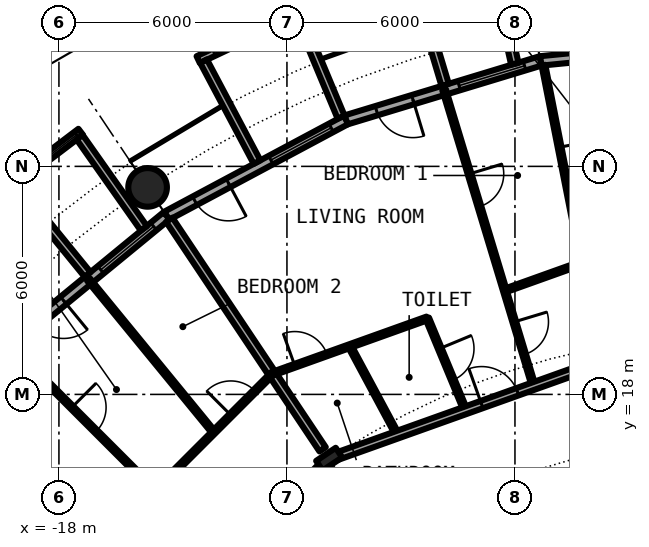
"""IFC4 building model, lengths in metres.
Left out: names, types, materials, properties, quantities, classifications, styles, units other than length and angle.
Written with IfcOpenShell. Run it as: python <this file> out.ifc"""

import sys

from ifc_helpers import new_model, si_unit, direction, frame, frame_2d, origin, origin_2d, place, context, subcontext, project, spatial, rectangle, circle, hollow_circle, i_section, extrude, element, fill, save


model = new_model("IFC4")
c1 = context("Model", 3, precision=1e-05, world=origin(), true_north=direction((0.0, 1.0)))
c2 = subcontext(c1, "Body", "Model", "MODEL_VIEW")
j1 = project(units=[si_unit("LENGTHUNIT", "METRE"), si_unit("PLANEANGLEUNIT", "RADIAN")], contexts=[c1])
p1 = place(None, origin())
s1 = spatial("IfcSite", under=j1, at=p1, CompositionType="ELEMENT")
p2 = place(p1, origin())
s2 = spatial("IfcBuilding", under=s1, at=p2, CompositionType="ELEMENT")
p3 = place(p2, frame((0.0, 0.0, 41.1)))
s3 = spatial("IfcBuildingStorey", under=s2, at=p3, CompositionType="ELEMENT", Elevation=41.1)
p4 = place(p3, frame((-15.667, 23.448, 0.0), z_axis=(0.0, 0.0, 1.0), x_axis=(1.0, 0.0, 0.0)))
e1 = element("IfcColumn", 1, at=p4, inside=s3, PredefinedType="COLUMN", context=c2, shape_type="SweptSolid", body=[
    extrude(hollow_circle(Radius=0.508, WallThickness=0.05, at=origin_2d()), origin(), (0.0, 0.0, 1.0), 3.05),
])
p5 = place(p3, frame((-10.889, 16.297, 0.0), z_axis=(0.0, 0.0, 1.0), x_axis=(-0.55557023302, 0.831469612303, 0.0)))
e2 = element("IfcColumn", 2, at=p5, inside=s3, PredefinedType="COLUMN", context=c2, shape_type="SweptSolid", body=[
    extrude(i_section(OverallWidth=0.305, OverallDepth=0.62, WebThickness=0.021, FlangeThickness=0.04, FilletRadius=0.027, at=origin_2d()), origin(), (0.0, 0.0, 1.0), 3.05),
])
p6 = place(p3, frame((0.0, 27.3, 0.0), z_axis=(0.0, 0.0, 1.0), x_axis=(-0.995173996315, -0.098126026407, 0.0)))
e3 = element("IfcWall", 3, at=p6, inside=s3, PredefinedType="SOLIDWALL", context=c2, shape_type="SweptSolid", body=[
    extrude(rectangle(XDim=5.352, YDim=0.25, at=frame_2d((2.676, 0.0))), origin(), (0.0, 0.0, 1.0), 2.7),
])
p7 = place(p6, frame((0.441, 0.0, 0.3)))
e4 = element("IfcOpeningElement", 4, at=p7, cuts=e3, PredefinedType="OPENING", context=c2, shape_type="SweptSolid", body=[
    extrude(rectangle(XDim=1.8, YDim=2.1, at=frame_2d((0.9, 1.05))), frame((0.0, 0.135, 0.0), z_axis=(0.0, -1.0, 0.0), x_axis=(1.0, 0.0, 0.0)), (0.0, 0.0, 1.0), 0.27),
])
p8 = place(p6, frame((3.51, 0.0, 0.0)))
e5 = element("IfcOpeningElement", 5, at=p8, cuts=e3, PredefinedType="OPENING", context=c2, shape_type="SweptSolid", body=[
    extrude(rectangle(XDim=1.0, YDim=2.2, at=frame_2d((0.5, 1.1))), frame((0.0, 0.135, 0.0), z_axis=(0.0, -1.0, 0.0), x_axis=(1.0, 0.0, 0.0)), (0.0, 0.0, 1.0), 0.27),
])
p9 = place(p3, frame((-5.326, 26.775, 0.0), z_axis=(0.0, 0.0, 1.0), x_axis=(-0.956965678721, -0.290201119486, 0.0)))
e6 = element("IfcWall", 6, at=p9, inside=s3, PredefinedType="SOLIDWALL", context=c2, shape_type="SweptSolid", body=[
    extrude(rectangle(XDim=5.351, YDim=0.25, at=frame_2d((2.676, 0.0))), origin(), (0.0, 0.0, 1.0), 2.7),
])
p10 = place(p9, frame((0.441, 0.0, 0.3)))
e7 = element("IfcOpeningElement", 7, at=p10, cuts=e6, PredefinedType="OPENING", context=c2, shape_type="SweptSolid", body=[
    extrude(rectangle(XDim=1.8, YDim=2.1, at=frame_2d((0.9, 1.05))), frame((0.0, 0.135, 0.0), z_axis=(0.0, -1.0, 0.0), x_axis=(1.0, 0.0, 0.0)), (0.0, 0.0, 1.0), 0.27),
])
p11 = place(p9, frame((3.51, 0.0, 0.0)))
e8 = element("IfcOpeningElement", 8, at=p11, cuts=e6, PredefinedType="OPENING", context=c2, shape_type="SweptSolid", body=[
    extrude(rectangle(XDim=1.0, YDim=2.2, at=frame_2d((0.5, 1.1))), frame((0.0, 0.135, 0.0), z_axis=(0.0, -1.0, 0.0), x_axis=(1.0, 0.0, 0.0)), (0.0, 0.0, 1.0), 0.27),
])
p12 = place(p3, frame((-6.004, 26.7, -0.03), z_axis=(0.0, 0.0, 1.0), x_axis=(-0.219609259383, 0.975587911566, 0.0)))
e9 = element("IfcWall", 9, at=p12, inside=s3, PredefinedType="SOLIDWALL", context=c2, shape_type="SweptSolid", body=[
    extrude(rectangle(XDim=2.933, YDim=0.2, at=frame_2d((1.466, 0.0))), origin(), (0.0, 0.0, 1.0), 2.73),
])
p13 = place(p3, frame((-7.837, 26.144, -0.03), z_axis=(0.0, 0.0, 1.0), x_axis=(-0.287064767992, 0.957911174889, 0.0)))
e10 = element("IfcWall", 10, at=p13, inside=s3, PredefinedType="SOLIDWALL", context=c2, shape_type="SweptSolid", body=[
    extrude(rectangle(XDim=3.006, YDim=0.2, at=frame_2d((1.503, 0.0))), origin(), (0.0, 0.0, 1.0), 2.73),
])
p14 = place(p3, frame((-10.447, 25.222, 0.0), z_axis=(0.0, 0.0, 1.0), x_axis=(-0.881915646801, -0.471407246368, 0.0)))
e11 = element("IfcWall", 11, at=p14, inside=s3, PredefinedType="SOLIDWALL", context=c2, shape_type="SweptSolid", body=[
    extrude(rectangle(XDim=5.352, YDim=0.25, at=frame_2d((2.676, 0.0))), origin(), (0.0, 0.0, 1.0), 2.7),
])
p15 = place(p14, frame((0.441, 0.0, 0.3)))
e12 = element("IfcOpeningElement", 12, at=p15, cuts=e11, PredefinedType="OPENING", context=c2, shape_type="SweptSolid", body=[
    extrude(rectangle(XDim=1.8, YDim=2.1, at=frame_2d((0.9, 1.05))), frame((0.0, 0.135, 0.0), z_axis=(0.0, -1.0, 0.0), x_axis=(1.0, 0.0, 0.0)), (0.0, 0.0, 1.0), 0.27),
])
p16 = place(p14, frame((3.51, 0.0, 0.0)))
e13 = element("IfcOpeningElement", 13, at=p16, cuts=e11, PredefinedType="OPENING", context=c2, shape_type="SweptSolid", body=[
    extrude(rectangle(XDim=1.0, YDim=2.2, at=frame_2d((0.5, 1.1))), frame((0.0, 0.135, 0.0), z_axis=(0.0, -1.0, 0.0), x_axis=(1.0, 0.0, 0.0)), (0.0, 0.0, 1.0), 0.27),
])
p17 = place(p3, frame((-11.629, 28.088, -0.03), z_axis=(0.0, 0.0, 1.0), x_axis=(-0.904000060331, -0.427532327342, 0.0)))
e14 = element("IfcWall", 14, at=p17, inside=s3, PredefinedType="SOLIDWALL", context=c2, shape_type="SweptSolid", body=[
    extrude(rectangle(XDim=2.993, YDim=0.2, at=frame_2d((1.497, 0.0))), origin(), (0.0, 0.0, 1.0), 2.73),
])
p18 = place(p17, frame((0.457, 0.0, 0.33)))
e15 = element("IfcOpeningElement", 15, at=p18, cuts=e14, PredefinedType="OPENING", context=c2, shape_type="SweptSolid", body=[
    extrude(circle(Radius=1.04, at=frame_2d((1.04, 1.04))), frame((0.0, 0.11, 0.0), z_axis=(0.0, -1.0, 0.0), x_axis=(1.0, 0.0, 0.0)), (0.0, 0.0, 1.0), 0.22),
])
p19 = place(p3, frame((-10.575, 25.295, -0.03), z_axis=(0.0, 0.0, 1.0), x_axis=(-0.385697364644, 0.922625353492, 0.0)))
e16 = element("IfcWall", 16, at=p19, inside=s3, PredefinedType="SOLIDWALL", context=c2, shape_type="SweptSolid", body=[
    extrude(rectangle(XDim=2.883, YDim=0.2, at=frame_2d((1.442, 0.0))), origin(), (0.0, 0.0, 1.0), 2.73),
])
p20 = place(p3, frame((-12.787, 24.113, -0.03), z_axis=(0.0, 0.0, 1.0), x_axis=(-0.468365282436, 0.883534924159, 0.0)))
e17 = element("IfcWall", 17, at=p20, inside=s3, PredefinedType="SOLIDWALL", context=c2, shape_type="SweptSolid", body=[
    extrude(rectangle(XDim=3.006, YDim=0.2, at=frame_2d((1.503, 0.0))), origin(), (0.0, 0.0, 1.0), 2.73),
])
p21 = place(p3, frame((-15.167, 22.699, 0.0), z_axis=(0.0, 0.0, 1.0), x_axis=(-0.773019449054, -0.634382322723, 0.0)))
e18 = element("IfcWall", 18, at=p21, inside=s3, PredefinedType="SOLIDWALL", context=c2, shape_type="SweptSolid", body=[
    extrude(rectangle(XDim=5.352, YDim=0.25, at=frame_2d((2.676, 0.0))), origin(), (0.0, 0.0, 1.0), 2.7),
])
p22 = place(p21, frame((0.441, 0.0, 0.3)))
e19 = element("IfcOpeningElement", 19, at=p22, cuts=e18, PredefinedType="OPENING", context=c2, shape_type="SweptSolid", body=[
    extrude(rectangle(XDim=1.8, YDim=2.1, at=frame_2d((0.9, 1.05))), frame((0.0, 0.135, 0.0), z_axis=(0.0, -1.0, 0.0), x_axis=(1.0, 0.0, 0.0)), (0.0, 0.0, 1.0), 0.27),
])
p23 = place(p21, frame((3.51, 0.0, 0.0)))
e20 = element("IfcOpeningElement", 20, at=p23, cuts=e18, PredefinedType="OPENING", context=c2, shape_type="SweptSolid", body=[
    extrude(rectangle(XDim=1.0, YDim=2.2, at=frame_2d((0.5, 1.1))), frame((0.0, 0.135, 0.0), z_axis=(0.0, -1.0, 0.0), x_axis=(1.0, 0.0, 0.0)), (0.0, 0.0, 1.0), 0.27),
])
p24 = place(p3, frame((-17.427, 24.909, -0.03), z_axis=(0.0, 0.0, 1.0), x_axis=(-0.796842165306, -0.60418752353, 0.0)))
e21 = element("IfcWall", 21, at=p24, inside=s3, PredefinedType="SOLIDWALL", context=c2, shape_type="SweptSolid", body=[
    extrude(rectangle(XDim=2.337, YDim=0.2, at=frame_2d((1.168, 0.0))), origin(), (0.0, 0.0, 1.0), 2.73),
])
p25 = place(p24, frame((0.128, 0.0, 0.33)))
e22 = element("IfcOpeningElement", 22, at=p25, cuts=e21, PredefinedType="OPENING", context=c2, shape_type="SweptSolid", body=[
    extrude(circle(Radius=1.04, at=frame_2d((1.04, 1.04))), frame((0.0, 0.11, 0.0), z_axis=(0.0, -1.0, 0.0), x_axis=(1.0, 0.0, 0.0)), (0.0, 0.0, 1.0), 0.22),
])
p26 = place(p3, frame((-15.765, 22.37, -0.03), z_axis=(0.0, 0.0, 1.0), x_axis=(-0.576274612209, 0.817256123454, 0.0)))
e23 = element("IfcWall", 23, at=p26, inside=s3, PredefinedType="SOLIDWALL", context=c2, shape_type="SweptSolid", body=[
    extrude(rectangle(XDim=2.933, YDim=0.2, at=frame_2d((1.466, 0.0))), origin(), (0.0, 0.0, 1.0), 2.73),
])
p27 = place(p3, frame((-17.246, 21.155, -0.03), z_axis=(0.0, 0.0, 1.0), x_axis=(-0.631741648902, 0.775179004516, 0.0)))
e24 = element("IfcWall", 24, at=p27, inside=s3, PredefinedType="SOLIDWALL", context=c2, shape_type="SweptSolid", body=[
    extrude(rectangle(XDim=3.006, YDim=0.2, at=frame_2d((1.503, 0.0))), origin(), (0.0, 0.0, 1.0), 2.73),
])
p28 = place(p3, frame((-19.216, 19.216, 0.0), z_axis=(0.0, 0.0, 1.0), x_axis=(0.707106781187, -0.707106781187, 0.0)))
e25 = element("IfcWall", 25, at=p28, inside=s3, PredefinedType="PARTITIONING", context=c2, shape_type="SweptSolid", body=[
    extrude(rectangle(XDim=5.305, YDim=0.1, at=frame_2d((2.652, 0.0))), origin(), (0.0, 0.0, 1.0), 2.7),
])
p29 = place(p28, frame((2.202, 0.0, 0.0)))
e26 = element("IfcOpeningElement", 26, at=p29, cuts=e25, PredefinedType="OPENING", context=c2, shape_type="SweptSolid", body=[
    extrude(rectangle(XDim=0.9, YDim=2.3, at=frame_2d((0.45, 1.15))), frame((0.0, 0.06, 0.0), z_axis=(0.0, -1.0, 0.0), x_axis=(1.0, 0.0, 0.0)), (0.0, 0.0, 1.0), 0.12),
])
p30 = place(p3, frame((-17.221, 21.022, 0.0), z_axis=(0.0, 0.0, 1.0), x_axis=(0.633662498939, -0.773609615658, 0.0)))
e27 = element("IfcWall", 27, at=p30, inside=s3, PredefinedType="PARTITIONING", context=c2, shape_type="SweptSolid", body=[
    extrude(rectangle(XDim=5.195, YDim=0.1, at=frame_2d((2.598, 0.0))), origin(), (0.0, 0.0, 1.0), 2.7),
])
p31 = place(p3, frame((-15.097, 22.595, 0.0), z_axis=(0.0, 0.0, 1.0), x_axis=(0.555576285599, -0.831465568067, 0.0)))
e28 = element("IfcWall", 28, at=p31, inside=s3, PredefinedType="PARTITIONING", context=c2, shape_type="SweptSolid", body=[
    extrude(rectangle(XDim=7.264, YDim=0.2, at=frame_2d((3.632, 0.0))), origin(), (0.0, 0.0, 1.0), 2.7),
])
p32 = place(p3, frame((-10.349, 19.272, 0.0), z_axis=(0.0, 0.0, 1.0), x_axis=(0.473203488521, -0.880953153381, 0.0)))
e29 = element("IfcWall", 29, at=p32, inside=s3, PredefinedType="PARTITIONING", context=c2, shape_type="SweptSolid", body=[
    extrude(rectangle(XDim=2.648, YDim=0.1, at=frame_2d((1.324, 0.0))), origin(), (0.0, 0.0, 1.0), 2.7),
])
p33 = place(p3, frame((-8.308, 20.002, 0.0), z_axis=(0.0, 0.0, 1.0), x_axis=(0.38363686428, -0.923484031462, 0.0)))
e30 = element("IfcWall", 30, at=p33, inside=s3, PredefinedType="PARTITIONING", context=c2, shape_type="SweptSolid", body=[
    extrude(rectangle(XDim=2.623, YDim=0.1, at=frame_2d((1.311, 0.0))), origin(), (0.0, 0.0, 1.0), 2.7),
])
p34 = place(p33, frame((0.861, 0.0, 0.0)))
e31 = element("IfcOpeningElement", 31, at=p34, cuts=e30, PredefinedType="OPENING", context=c2, shape_type="SweptSolid", body=[
    extrude(rectangle(XDim=0.9, YDim=2.3, at=frame_2d((0.45, 1.15))), frame((0.0, 0.06, 0.0), z_axis=(0.0, -1.0, 0.0), x_axis=(1.0, 0.0, 0.0)), (0.0, 0.0, 1.0), 0.12),
])
p35 = place(p3, frame((-7.863, 26.012, 0.0), z_axis=(0.0, 0.0, 1.0), x_axis=(0.289372881225, -0.957216451808, 0.0)))
e32 = element("IfcWall", 32, at=p35, inside=s3, PredefinedType="PARTITIONING", context=c2, shape_type="SweptSolid", body=[
    extrude(rectangle(XDim=8.138, YDim=0.1, at=frame_2d((4.069, 0.0))), origin(), (0.0, 0.0, 1.0), 2.7),
])
p36 = place(p35, frame((6.377, 0.0, 0.0)))
e33 = element("IfcOpeningElement", 33, at=p36, cuts=e32, PredefinedType="OPENING", context=c2, shape_type="SweptSolid", body=[
    extrude(rectangle(XDim=0.9, YDim=2.3, at=frame_2d((0.45, 1.15))), frame((0.0, 0.06, 0.0), z_axis=(0.0, -1.0, 0.0), x_axis=(1.0, 0.0, 0.0)), (0.0, 0.0, 1.0), 0.12),
])
p37 = place(p35, frame((2.308, 0.0, 0.0)))
e34 = element("IfcOpeningElement", 34, at=p37, cuts=e32, PredefinedType="OPENING", context=c2, shape_type="SweptSolid", body=[
    extrude(rectangle(XDim=0.9, YDim=2.3, at=frame_2d((0.45, 1.15))), frame((0.0, 0.06, 0.0), z_axis=(0.0, -1.0, 0.0), x_axis=(1.0, 0.0, 0.0)), (0.0, 0.0, 1.0), 0.12),
])
p38 = place(p3, frame((-5.251, 26.663, 0.0), z_axis=(0.0, 0.0, 1.0), x_axis=(0.193334397611, -0.981132922035, 0.0)))
e35 = element("IfcWall", 35, at=p38, inside=s3, PredefinedType="PARTITIONING", context=c2, shape_type="SweptSolid", body=[
    extrude(rectangle(XDim=5.301, YDim=0.1, at=frame_2d((2.651, 0.0))), origin(), (0.0, 0.0, 1.0), 2.7),
])
p39 = place(p38, frame((2.201, 0.0, 0.0)))
e36 = element("IfcOpeningElement", 36, at=p39, cuts=e35, PredefinedType="OPENING", context=c2, shape_type="SweptSolid", body=[
    extrude(rectangle(XDim=0.9, YDim=2.3, at=frame_2d((0.45, 1.15))), frame((0.0, 0.06, 0.0), z_axis=(0.0, -1.0, 0.0), x_axis=(1.0, 0.0, 0.0)), (0.0, 0.0, 1.0), 0.12),
])
p40 = place(p3, frame((-6.472, 15.613, 0.0), z_axis=(0.0, 0.0, 1.0), x_axis=(0.998789903976, 0.049180562371, 0.0)))
e37 = element("IfcWall", 37, at=p40, inside=s3, PredefinedType="PARTITIONING", context=c2, shape_type="SweptSolid", body=[
    extrude(rectangle(XDim=11.388, YDim=0.2, at=frame_2d((5.694, 0.0))), origin(), (0.0, 0.0, 1.0), 2.7),
])
p41 = place(p40, frame((4.383, 0.0, 0.0)))
e38 = element("IfcOpeningElement", 38, at=p41, cuts=e37, PredefinedType="OPENING", context=c2, shape_type="SweptSolid", body=[
    extrude(rectangle(XDim=1.0, YDim=2.3, at=frame_2d((0.5, 1.15))), frame((0.0, 0.11, 0.0), z_axis=(0.0, -1.0, 0.0), x_axis=(1.0, 0.0, 0.0)), (0.0, 0.0, 1.0), 0.22),
])
p42 = place(p3, frame((-10.742, 16.351, 0.0), z_axis=(0.0, 0.0, 1.0), x_axis=(0.941707755593, 0.336432018476, 0.0)))
e39 = element("IfcWall", 39, at=p42, inside=s3, PredefinedType="PARTITIONING", context=c2, shape_type="SweptSolid", body=[
    extrude(rectangle(XDim=9.381, YDim=0.2, at=frame_2d((4.69, 0.0))), origin(), (0.0, 0.0, 1.0), 2.38),
])
p43 = place(p42, frame((4.106, 0.0, 0.0)))
e40 = element("IfcOpeningElement", 40, at=p43, cuts=e39, PredefinedType="OPENING", context=c2, shape_type="SweptSolid", body=[
    extrude(rectangle(XDim=1.0, YDim=2.3, at=frame_2d((0.5, 1.15))), frame((0.0, 0.11, 0.0), z_axis=(0.0, -1.0, 0.0), x_axis=(1.0, 0.0, 0.0)), (0.0, 0.0, 1.0), 0.22),
])
p44 = place(p3, frame((-16.187, 10.999, 0.0), z_axis=(0.0, 0.0, 1.0), x_axis=(0.707106781187, 0.707106781187, 0.0)))
e41 = element("IfcWall", 41, at=p44, inside=s3, PredefinedType="PARTITIONING", context=c2, shape_type="SweptSolid", body=[
    extrude(rectangle(XDim=7.337, YDim=0.2, at=frame_2d((3.668, 0.0))), origin(), (0.0, 0.0, 1.0), 2.38),
])
p45 = place(p44, frame((4.124, 0.0, 0.0)))
e42 = element("IfcOpeningElement", 42, at=p45, cuts=e41, PredefinedType="OPENING", context=c2, shape_type="SweptSolid", body=[
    extrude(rectangle(XDim=1.0, YDim=2.3, at=frame_2d((0.5, 1.15))), frame((0.0, 0.11, 0.0), z_axis=(0.0, -1.0, 0.0), x_axis=(1.0, 0.0, 0.0)), (0.0, 0.0, 1.0), 0.22),
])
p46 = place(p3, frame((-12.393, 18.539, 0.0), z_axis=(0.0, 0.0, 1.0), x_axis=(0.941491894739, 0.337035624439, 0.0)))
e43 = element("IfcWall", 43, at=p46, inside=s3, PredefinedType="PARTITIONING", context=c2, shape_type="SweptSolid", body=[
    extrude(rectangle(XDim=4.335, YDim=0.1, at=frame_2d((2.167, 0.0))), origin(), (0.0, 0.0, 1.0), 2.7),
])
p47 = place(p46, frame((0.637, 0.0, 0.0)))
e44 = element("IfcOpeningElement", 44, at=p47, cuts=e43, PredefinedType="OPENING", context=c2, shape_type="SweptSolid", body=[
    extrude(rectangle(XDim=0.9, YDim=2.3, at=frame_2d((0.45, 1.15))), frame((0.0, 0.06, 0.0), z_axis=(0.0, -1.0, 0.0), x_axis=(1.0, 0.0, 0.0)), (0.0, 0.0, 1.0), 0.12),
])
p48 = place(p3, frame((-6.273, 20.73, 0.0), z_axis=(0.0, 0.0, 1.0), x_axis=(0.941501535708, 0.337008691666, 0.0)))
e45 = element("IfcWall", 45, at=p48, inside=s3, PredefinedType="PARTITIONING", context=c2, shape_type="SweptSolid", body=[
    extrude(rectangle(XDim=4.347, YDim=0.1, at=frame_2d((2.174, 0.0))), origin(), (0.0, 0.0, 1.0), 2.7),
])
p49 = place(p3, frame((-15.465, 15.465, 0.0), z_axis=(0.0, 0.0, 1.0), x_axis=(0.707022606819, 0.707190945535, 0.0)))
e46 = element("IfcWall", 46, at=p49, inside=s3, PredefinedType="PARTITIONING", context=c2, shape_type="SweptSolid", body=[
    extrude(rectangle(XDim=4.351, YDim=0.1, at=frame_2d((2.175, 0.0))), origin(), (0.0, 0.0, 1.0), 2.7),
])
p50 = place(p49, frame((2.813, 0.0, 0.0)))
e47 = element("IfcOpeningElement", 47, at=p50, cuts=e46, PredefinedType="OPENING", context=c2, shape_type="SweptSolid", body=[
    extrude(rectangle(XDim=0.9, YDim=2.3, at=frame_2d((0.45, 1.15))), frame((0.0, 0.06, 0.0), z_axis=(0.0, -1.0, 0.0), x_axis=(1.0, 0.0, 0.0)), (0.0, 0.0, 1.0), 0.12),
])
p51 = place(p10, origin())
e48 = element("IfcWindow", 48, at=p51, inside=s3, PartitioningType="SINGLE_PANEL", PredefinedType="WINDOW", context=c2, shape_type="SweptSolid", body=[
    extrude(rectangle(XDim=1.8, YDim=2.1, at=frame_2d((0.9, 1.05))), frame((0.0, 0.03, 0.0), z_axis=(0.0, -1.0, 0.0), x_axis=(1.0, 0.0, 0.0)), (0.0, 0.0, 1.0), 0.06),
])
fill(e7, e48)
p52 = place(p11, origin())
e49 = element("IfcDoor", 49, at=p52, inside=s3, OperationType="SINGLE_SWING_LEFT", PredefinedType="DOOR", context=c2, shape_type="SweptSolid", body=[
    extrude(rectangle(XDim=1.0, YDim=2.2, at=frame_2d((0.5, 1.1))), frame((0.0, 0.025, 0.0), z_axis=(0.0, -1.0, 0.0), x_axis=(1.0, 0.0, 0.0)), (0.0, 0.0, 1.0), 0.05),
])
fill(e8, e49)
p53 = place(p15, origin())
e50 = element("IfcWindow", 50, at=p53, inside=s3, PartitioningType="SINGLE_PANEL", PredefinedType="WINDOW", context=c2, shape_type="SweptSolid", body=[
    extrude(rectangle(XDim=1.8, YDim=2.1, at=frame_2d((0.9, 1.05))), frame((0.0, 0.03, 0.0), z_axis=(0.0, -1.0, 0.0), x_axis=(1.0, 0.0, 0.0)), (0.0, 0.0, 1.0), 0.06),
])
fill(e12, e50)
p54 = place(p18, origin())
e51 = element("IfcWindow", 51, at=p54, inside=s3, PartitioningType="SINGLE_PANEL", PredefinedType="WINDOW", context=c2, shape_type="SweptSolid", body=[
    extrude(circle(Radius=1.04, at=frame_2d((1.04, 1.04))), frame((0.0, 0.03, 0.0), z_axis=(0.0, -1.0, 0.0), x_axis=(1.0, 0.0, 0.0)), (0.0, 0.0, 1.0), 0.06),
])
fill(e15, e51)
p55 = place(p16, origin())
e52 = element("IfcDoor", 52, at=p55, inside=s3, OperationType="SINGLE_SWING_LEFT", PredefinedType="DOOR", context=c2, shape_type="SweptSolid", body=[
    extrude(rectangle(XDim=1.0, YDim=2.2, at=frame_2d((0.5, 1.1))), frame((0.0, 0.025, 0.0), z_axis=(0.0, -1.0, 0.0), x_axis=(1.0, 0.0, 0.0)), (0.0, 0.0, 1.0), 0.05),
])
fill(e13, e52)
p56 = place(p22, origin())
e53 = element("IfcWindow", 53, at=p56, inside=s3, PartitioningType="SINGLE_PANEL", PredefinedType="WINDOW", context=c2, shape_type="SweptSolid", body=[
    extrude(rectangle(XDim=1.8, YDim=2.1, at=frame_2d((0.9, 1.05))), frame((0.0, 0.03, 0.0), z_axis=(0.0, -1.0, 0.0), x_axis=(1.0, 0.0, 0.0)), (0.0, 0.0, 1.0), 0.06),
])
fill(e19, e53)
p57 = place(p25, origin())
e54 = element("IfcWindow", 54, at=p57, inside=s3, PartitioningType="SINGLE_PANEL", PredefinedType="WINDOW", context=c2, shape_type="SweptSolid", body=[
    extrude(circle(Radius=1.04, at=frame_2d((1.04, 1.04))), frame((0.0, 0.03, 0.0), z_axis=(0.0, -1.0, 0.0), x_axis=(1.0, 0.0, 0.0)), (0.0, 0.0, 1.0), 0.06),
])
fill(e22, e54)
p58 = place(p23, origin())
e55 = element("IfcDoor", 55, at=p58, inside=s3, OperationType="SINGLE_SWING_LEFT", PredefinedType="DOOR", context=c2, shape_type="SweptSolid", body=[
    extrude(rectangle(XDim=1.0, YDim=2.2, at=frame_2d((0.5, 1.1))), frame((0.0, 0.025, 0.0), z_axis=(0.0, -1.0, 0.0), x_axis=(1.0, 0.0, 0.0)), (0.0, 0.0, 1.0), 0.05),
])
fill(e20, e55)
p59 = place(p43, origin())
e56 = element("IfcDoor", 56, at=p59, inside=s3, OperationType="SINGLE_SWING_LEFT", PredefinedType="DOOR", context=c2, shape_type="SweptSolid", body=[
    extrude(rectangle(XDim=1.0, YDim=2.3, at=frame_2d((0.5, 1.15))), frame((0.0, 0.025, 0.0), z_axis=(0.0, -1.0, 0.0), x_axis=(1.0, 0.0, 0.0)), (0.0, 0.0, 1.0), 0.05),
])
fill(e40, e56)
p60 = place(p47, origin())
e57 = element("IfcDoor", 57, at=p60, inside=s3, OperationType="SINGLE_SWING_LEFT", PredefinedType="DOOR", context=c2, shape_type="SweptSolid", body=[
    extrude(rectangle(XDim=0.9, YDim=2.3, at=frame_2d((0.45, 1.15))), frame((0.0, 0.025, 0.0), z_axis=(0.0, -1.0, 0.0), x_axis=(1.0, 0.0, 0.0)), (0.0, 0.0, 1.0), 0.05),
])
fill(e44, e57)
p61 = place(p34, origin())
e58 = element("IfcDoor", 58, at=p61, inside=s3, OperationType="SINGLE_SWING_RIGHT", PredefinedType="DOOR", context=c2, shape_type="SweptSolid", body=[
    extrude(rectangle(XDim=0.9, YDim=2.3, at=frame_2d((0.45, 1.15))), frame((0.0, 0.025, 0.0), z_axis=(0.0, -1.0, 0.0), x_axis=(1.0, 0.0, 0.0)), (0.0, 0.0, 1.0), 0.05),
])
fill(e31, e58)
p62 = place(p36, origin())
e59 = element("IfcDoor", 59, at=p62, inside=s3, OperationType="SINGLE_SWING_RIGHT", PredefinedType="DOOR", context=c2, shape_type="SweptSolid", body=[
    extrude(rectangle(XDim=0.9, YDim=2.3, at=frame_2d((0.45, 1.15))), frame((0.0, 0.025, 0.0), z_axis=(0.0, -1.0, 0.0), x_axis=(1.0, 0.0, 0.0)), (0.0, 0.0, 1.0), 0.05),
])
fill(e33, e59)
p63 = place(p37, origin())
e60 = element("IfcDoor", 60, at=p63, inside=s3, OperationType="SINGLE_SWING_LEFT", PredefinedType="DOOR", context=c2, shape_type="SweptSolid", body=[
    extrude(rectangle(XDim=0.9, YDim=2.3, at=frame_2d((0.45, 1.15))), frame((0.0, 0.025, 0.0), z_axis=(0.0, -1.0, 0.0), x_axis=(1.0, 0.0, 0.0)), (0.0, 0.0, 1.0), 0.05),
])
fill(e34, e60)
p64 = place(p39, origin())
e61 = element("IfcDoor", 61, at=p64, inside=s3, OperationType="SINGLE_SWING_LEFT", PredefinedType="DOOR", context=c2, shape_type="SweptSolid", body=[
    extrude(rectangle(XDim=0.9, YDim=2.3, at=frame_2d((0.45, 1.15))), frame((0.0, 0.025, 0.0), z_axis=(0.0, -1.0, 0.0), x_axis=(1.0, 0.0, 0.0)), (0.0, 0.0, 1.0), 0.05),
])
fill(e36, e61)
p65 = place(p29, origin())
e62 = element("IfcDoor", 62, at=p65, inside=s3, OperationType="SINGLE_SWING_LEFT", PredefinedType="DOOR", context=c2, shape_type="SweptSolid", body=[
    extrude(rectangle(XDim=0.9, YDim=2.3, at=frame_2d((0.45, 1.15))), frame((0.0, 0.025, 0.0), z_axis=(0.0, -1.0, 0.0), x_axis=(1.0, 0.0, 0.0)), (0.0, 0.0, 1.0), 0.05),
])
fill(e26, e62)
p66 = place(p50, origin())
e63 = element("IfcDoor", 63, at=p66, inside=s3, OperationType="SINGLE_SWING_RIGHT", PredefinedType="DOOR", context=c2, shape_type="SweptSolid", body=[
    extrude(rectangle(XDim=0.9, YDim=2.3, at=frame_2d((0.45, 1.15))), frame((0.0, 0.025, 0.0), z_axis=(0.0, -1.0, 0.0), x_axis=(1.0, 0.0, 0.0)), (0.0, 0.0, 1.0), 0.05),
])
fill(e47, e63)
save(model, sys.argv[1])
